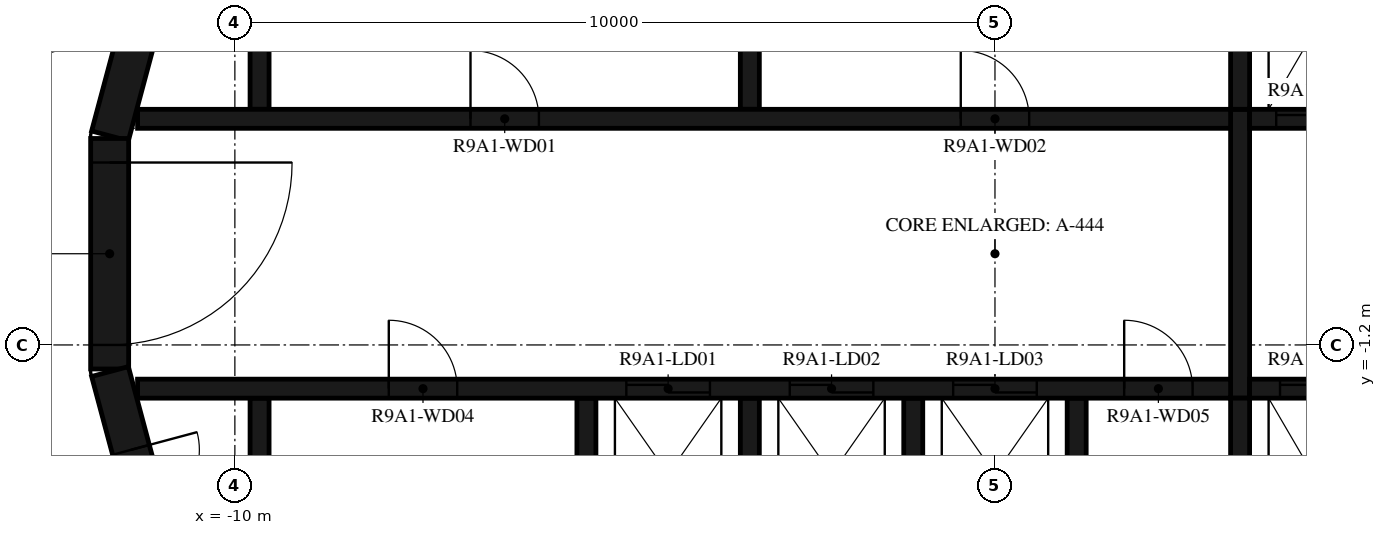
"""IFC4 building model, lengths in metres.
Left out: names, types, materials, properties, quantities, classifications, styles, units other than length and angle.
Written with IfcOpenShell. Run it as: python <this file> out.ifc"""

import sys

from ifc_helpers import new_model, si_unit, direction, frame, frame_2d, origin, place, context, subcontext, project, spatial, polyline, rectangle, outline, extrude, element, fill, save


model = new_model("IFC4")
c1 = context("Model", 3, precision=1e-05, world=origin(), true_north=direction((0.0, 1.0)))
c2 = subcontext(c1, "Body", "Model", "MODEL_VIEW")
j1 = project(units=[si_unit("LENGTHUNIT", "METRE"), si_unit("PLANEANGLEUNIT", "RADIAN")], contexts=[c1])
p1 = place(None, origin())
s1 = spatial("IfcSite", under=j1, at=p1, CompositionType="ELEMENT")
p2 = place(p1, origin())
s2 = spatial("IfcBuilding", under=s1, at=p2, CompositionType="ELEMENT")
p3 = place(p2, frame((0.0, 0.0, 336.5)))
s3 = spatial("IfcBuildingStorey", under=s2, at=p3, CompositionType="ELEMENT", Elevation=336.5)
p4 = place(p3, frame((-10.858, 4.479, 0.0), z_axis=(0.0, 0.0, 1.0), x_axis=(-0.258734743916, -0.965948410781, 0.0)))
e1 = element("IfcWall", 1, at=p4, inside=s3, PredefinedType="SHEAR", context=c2, shape_type="SweptSolid", body=[
    extrude(rectangle(XDim=3.033, YDim=0.5, at=frame_2d((1.516, 0.0))), origin(), (0.0, 0.0, 1.0), 3.12),
])
p5 = place(p3, frame((-11.647, 1.516, 0.0), z_axis=(0.0, 0.0, 1.0), x_axis=(0.0, -1.0, 0.0)))
e2 = element("IfcWall", 2, at=p5, inside=s3, PredefinedType="SHEAR", context=c2, shape_type="SweptSolid", body=[
    extrude(rectangle(XDim=3.033, YDim=0.5, at=frame_2d((1.516, 0.0))), origin(), (0.0, 0.0, 1.0), 3.12),
])
p6 = place(p5, frame((0.316, 0.0, 0.0)))
e3 = element("IfcOpeningElement", 3, at=p6, cuts=e2, PredefinedType="OPENING", context=c2, shape_type="SweptSolid", body=[
    extrude(rectangle(XDim=2.4, YDim=2.1, at=frame_2d((1.2, 1.05))), frame((0.0, 0.26, 0.0), z_axis=(0.0, -1.0, 0.0), x_axis=(1.0, 0.0, 0.0)), (0.0, 0.0, 1.0), 0.52),
])
p7 = place(p3, frame((-11.643, -1.55, 0.0), z_axis=(0.0, 0.0, 1.0), x_axis=(0.258734743916, -0.965948410781, 0.0)))
e4 = element("IfcWall", 4, at=p7, inside=s3, PredefinedType="SHEAR", context=c2, shape_type="SweptSolid", body=[
    extrude(rectangle(XDim=3.033, YDim=0.5, at=frame_2d((1.516, 0.0))), origin(), (0.0, 0.0, 1.0), 3.12),
])
p8 = place(p7, frame((1.066, 0.0, 0.0)))
e5 = element("IfcOpeningElement", 5, at=p8, cuts=e4, PredefinedType="OPENING", context=c2, shape_type="SweptSolid", body=[
    extrude(rectangle(XDim=0.9, YDim=2.1, at=frame_2d((0.45, 1.05))), frame((0.0, 0.26, 0.0), z_axis=(0.0, -1.0, 0.0), x_axis=(1.0, 0.0, 0.0)), (0.0, 0.0, 1.0), 0.52),
])
p9 = place(p3, origin())
e6 = element("IfcWall", 6, at=p9, inside=s3, PredefinedType="SHEAR", context=c2, shape_type="SweptSolid", body=[
    extrude(outline(polyline([(-9.8, 1.9), (-9.55, 1.9), (-9.55, 4.8), (-3.35, 4.8), (-3.35, 1.9), (-3.1, 1.9), (-3.1, 4.8), (3.1, 4.8), (3.1, 1.9), (3.35, 1.9), (3.35, 4.8), (5.25, 4.8), (5.25, 1.9), (5.5, 1.9), (5.5, 4.8), (7.4, 4.8), (7.4, 1.9), (7.65, 1.9), (7.65, 4.8), (9.55, 4.8), (9.55, 1.9), (9.8, 1.9), (9.8, 4.8), (9.8, 5.05), (-9.8, 5.05), (-9.8, 4.8), (-9.8, 1.9)])), origin(), (0.0, 0.0, 1.0), 3.12),
])
p10 = place(p3, origin())
e7 = element("IfcWall", 7, at=p10, inside=s3, PredefinedType="SHEAR", context=c2, shape_type="SweptSolid", body=[
    extrude(outline(polyline([(9.8, -5.05), (9.8, -4.8), (9.8, -1.9), (9.55, -1.9), (9.55, -4.8), (7.65, -4.8), (7.65, -1.9), (7.4, -1.9), (7.4, -4.8), (5.5, -4.8), (5.5, -1.9), (5.25, -1.9), (5.25, -4.8), (3.35, -4.8), (3.35, -1.9), (3.1, -1.9), (3.1, -4.8), (1.2, -4.8), (1.2, -1.9), (0.95, -1.9), (0.95, -4.8), (-0.95, -4.8), (-0.95, -1.9), (-1.2, -1.9), (-1.2, -4.8), (-3.1, -4.8), (-3.1, -1.9), (-3.35, -1.9), (-3.35, -4.8), (-5.25, -4.8), (-5.25, -1.9), (-5.5, -1.9), (-5.5, -4.8), (-9.55, -4.8), (-9.55, -1.9), (-9.8, -1.9), (-9.8, -4.8), (-9.8, -5.05), (9.8, -5.05)])), origin(), (0.0, 0.0, 1.0), 3.12),
])
p11 = place(p3, frame((-11.28, 1.775, 0.0), z_axis=(0.0, 0.0, 1.0), x_axis=(1.0, 0.0, 0.0)))
e8 = element("IfcWall", 8, at=p11, inside=s3, PredefinedType="SHEAR", context=c2, shape_type="SweptSolid", body=[
    extrude(rectangle(XDim=14.38, YDim=0.25, at=frame_2d((7.19, 0.0))), origin(), (0.0, 0.0, 1.0), 3.12),
])
p12 = place(p11, frame((4.38, 0.0, 0.0)))
e9 = element("IfcOpeningElement", 9, at=p12, cuts=e8, PredefinedType="OPENING", context=c2, shape_type="SweptSolid", body=[
    extrude(rectangle(XDim=0.9, YDim=2.1, at=frame_2d((0.45, 1.05))), frame((0.0, 0.135, 0.0), z_axis=(0.0, -1.0, 0.0), x_axis=(1.0, 0.0, 0.0)), (0.0, 0.0, 1.0), 0.27),
])
p13 = place(p11, frame((10.83, 0.0, 0.0)))
e10 = element("IfcOpeningElement", 10, at=p13, cuts=e8, PredefinedType="OPENING", context=c2, shape_type="SweptSolid", body=[
    extrude(rectangle(XDim=0.9, YDim=2.1, at=frame_2d((0.45, 1.05))), frame((0.0, 0.135, 0.0), z_axis=(0.0, -1.0, 0.0), x_axis=(1.0, 0.0, 0.0)), (0.0, 0.0, 1.0), 0.27),
])
p14 = place(p3, frame((3.35, 1.775, 0.0), z_axis=(0.0, 0.0, 1.0), x_axis=(1.0, 0.0, 0.0)))
e11 = element("IfcWall", 11, at=p14, inside=s3, PredefinedType="SHEAR", context=c2, shape_type="SweptSolid", body=[
    extrude(rectangle(XDim=7.93, YDim=0.25, at=frame_2d((3.965, 0.0))), origin(), (0.0, 0.0, 1.0), 3.12),
])
p15 = place(p14, frame((0.35, 0.0, 0.0)))
e12 = element("IfcOpeningElement", 12, at=p15, cuts=e11, PredefinedType="OPENING", context=c2, shape_type="SweptSolid", body=[
    extrude(rectangle(XDim=1.2, YDim=2.4, at=frame_2d((0.6, 1.2))), frame((0.0, 0.135, 0.0), z_axis=(0.0, -1.0, 0.0), x_axis=(1.0, 0.0, 0.0)), (0.0, 0.0, 1.0), 0.27),
])
p16 = place(p14, frame((2.5, 0.0, 0.0)))
e13 = element("IfcOpeningElement", 13, at=p16, cuts=e11, PredefinedType="OPENING", context=c2, shape_type="SweptSolid", body=[
    extrude(rectangle(XDim=1.2, YDim=2.4, at=frame_2d((0.6, 1.2))), frame((0.0, 0.135, 0.0), z_axis=(0.0, -1.0, 0.0), x_axis=(1.0, 0.0, 0.0)), (0.0, 0.0, 1.0), 0.27),
])
p17 = place(p14, frame((4.8, 0.0, 0.0)))
e14 = element("IfcOpeningElement", 14, at=p17, cuts=e11, PredefinedType="OPENING", context=c2, shape_type="SweptSolid", body=[
    extrude(rectangle(XDim=0.9, YDim=2.1, at=frame_2d((0.45, 1.05))), frame((0.0, 0.135, 0.0), z_axis=(0.0, -1.0, 0.0), x_axis=(1.0, 0.0, 0.0)), (0.0, 0.0, 1.0), 0.27),
])
p18 = place(p3, frame((-11.28, -1.775, 0.0), z_axis=(0.0, 0.0, 1.0), x_axis=(1.0, 0.0, 0.0)))
e15 = element("IfcWall", 15, at=p18, inside=s3, PredefinedType="SHEAR", context=c2, shape_type="SweptSolid", body=[
    extrude(rectangle(XDim=14.38, YDim=0.25, at=frame_2d((7.19, 0.0))), origin(), (0.0, 0.0, 1.0), 3.12),
])
p19 = place(p18, frame((6.43, 0.0, 0.0)))
e16 = element("IfcOpeningElement", 16, at=p19, cuts=e15, PredefinedType="OPENING", context=c2, shape_type="SweptSolid", body=[
    extrude(rectangle(XDim=1.1, YDim=2.1, at=frame_2d((0.55, 1.05))), frame((0.0, 0.135, 0.0), z_axis=(0.0, -1.0, 0.0), x_axis=(1.0, 0.0, 0.0)), (0.0, 0.0, 1.0), 0.27),
])
p20 = place(p18, frame((8.58, 0.0, 0.0)))
e17 = element("IfcOpeningElement", 17, at=p20, cuts=e15, PredefinedType="OPENING", context=c2, shape_type="SweptSolid", body=[
    extrude(rectangle(XDim=1.1, YDim=2.1, at=frame_2d((0.55, 1.05))), frame((0.0, 0.135, 0.0), z_axis=(0.0, -1.0, 0.0), x_axis=(1.0, 0.0, 0.0)), (0.0, 0.0, 1.0), 0.27),
])
p21 = place(p18, frame((10.73, 0.0, 0.0)))
e18 = element("IfcOpeningElement", 18, at=p21, cuts=e15, PredefinedType="OPENING", context=c2, shape_type="SweptSolid", body=[
    extrude(rectangle(XDim=1.1, YDim=2.1, at=frame_2d((0.55, 1.05))), frame((0.0, 0.135, 0.0), z_axis=(0.0, -1.0, 0.0), x_axis=(1.0, 0.0, 0.0)), (0.0, 0.0, 1.0), 0.27),
])
p22 = place(p18, frame((3.305, 0.0, 0.0)))
e19 = element("IfcOpeningElement", 19, at=p22, cuts=e15, PredefinedType="OPENING", context=c2, shape_type="SweptSolid", body=[
    extrude(rectangle(XDim=0.9, YDim=2.1, at=frame_2d((0.45, 1.05))), frame((0.0, 0.135, 0.0), z_axis=(0.0, -1.0, 0.0), x_axis=(1.0, 0.0, 0.0)), (0.0, 0.0, 1.0), 0.27),
])
p23 = place(p18, frame((12.98, 0.0, 0.0)))
e20 = element("IfcOpeningElement", 20, at=p23, cuts=e15, PredefinedType="OPENING", context=c2, shape_type="SweptSolid", body=[
    extrude(rectangle(XDim=0.9, YDim=2.1, at=frame_2d((0.45, 1.05))), frame((0.0, 0.135, 0.0), z_axis=(0.0, -1.0, 0.0), x_axis=(1.0, 0.0, 0.0)), (0.0, 0.0, 1.0), 0.27),
])
p24 = place(p3, frame((3.35, -1.775, 0.0), z_axis=(0.0, 0.0, 1.0), x_axis=(1.0, 0.0, 0.0)))
e21 = element("IfcWall", 21, at=p24, inside=s3, PredefinedType="SHEAR", context=c2, shape_type="SweptSolid", body=[
    extrude(rectangle(XDim=7.93, YDim=0.25, at=frame_2d((3.965, 0.0))), origin(), (0.0, 0.0, 1.0), 3.12),
])
p25 = place(p24, frame((0.4, 0.0, 0.0)))
e22 = element("IfcOpeningElement", 22, at=p25, cuts=e21, PredefinedType="OPENING", context=c2, shape_type="SweptSolid", body=[
    extrude(rectangle(XDim=1.1, YDim=2.4, at=frame_2d((0.55, 1.2))), frame((0.0, 0.135, 0.0), z_axis=(0.0, -1.0, 0.0), x_axis=(1.0, 0.0, 0.0)), (0.0, 0.0, 1.0), 0.27),
])
p26 = place(p24, frame((2.55, 0.0, 0.0)))
e23 = element("IfcOpeningElement", 23, at=p26, cuts=e21, PredefinedType="OPENING", context=c2, shape_type="SweptSolid", body=[
    extrude(rectangle(XDim=1.1, YDim=2.4, at=frame_2d((0.55, 1.2))), frame((0.0, 0.135, 0.0), z_axis=(0.0, -1.0, 0.0), x_axis=(1.0, 0.0, 0.0)), (0.0, 0.0, 1.0), 0.27),
])
p27 = place(p24, frame((4.7, 0.0, 0.0)))
e24 = element("IfcOpeningElement", 24, at=p27, cuts=e21, PredefinedType="OPENING", context=c2, shape_type="SweptSolid", body=[
    extrude(rectangle(XDim=1.1, YDim=2.4, at=frame_2d((0.55, 1.2))), frame((0.0, 0.135, 0.0), z_axis=(0.0, -1.0, 0.0), x_axis=(1.0, 0.0, 0.0)), (0.0, 0.0, 1.0), 0.27),
])
p28 = place(p3, frame((3.225, -1.9, 0.0), z_axis=(0.0, 0.0, 1.0), x_axis=(0.0, 1.0, 0.0)))
e25 = element("IfcWall", 25, at=p28, inside=s3, PredefinedType="SHEAR", context=c2, shape_type="SweptSolid", body=[
    extrude(rectangle(XDim=3.8, YDim=0.25, at=frame_2d((1.9, 0.0))), origin(), (0.0, 0.0, 1.0), 3.12),
])
p29 = place(p3, frame((-13.769, -1.691, 0.0), z_axis=(0.0, 0.0, 1.0), x_axis=(0.372720094028, -0.927943819155, 0.0)))
e26 = element("IfcWall", 26, at=p29, inside=s3, PredefinedType="STANDARD", context=c2, shape_type="SweptSolid", body=[
    extrude(rectangle(XDim=4.875, YDim=0.2, at=frame_2d((2.438, 0.0))), origin(), (0.0, 0.0, 1.0), 3.12),
])
p30 = place(p6, origin())
e27 = element("IfcDoor", 27, at=p30, inside=s3, OperationType="DOUBLE_DOOR_SINGLE_SWING", PredefinedType="DOOR", context=c2, shape_type="SweptSolid", body=[
    extrude(rectangle(XDim=2.4, YDim=2.1, at=frame_2d((1.2, 1.05))), frame((0.0, 0.025, 0.0), z_axis=(0.0, -1.0, 0.0), x_axis=(1.0, 0.0, 0.0)), (0.0, 0.0, 1.0), 0.05),
])
fill(e3, e27)
p31 = place(p15, origin())
e28 = element("IfcDoor", 28, at=p31, inside=s3, OperationType="DOUBLE_DOOR_SLIDING", PredefinedType="DOOR", context=c2, shape_type="SweptSolid", body=[
    extrude(rectangle(XDim=1.2, YDim=2.4, at=frame_2d((0.6, 1.2))), frame((0.0, 0.025, 0.0), z_axis=(0.0, -1.0, 0.0), x_axis=(1.0, 0.0, 0.0)), (0.0, 0.0, 1.0), 0.05),
])
fill(e12, e28)
p32 = place(p19, origin())
e29 = element("IfcDoor", 29, at=p32, inside=s3, OperationType="DOUBLE_DOOR_SLIDING", PredefinedType="DOOR", context=c2, shape_type="SweptSolid", body=[
    extrude(rectangle(XDim=1.1, YDim=2.1, at=frame_2d((0.55, 1.05))), frame((0.0, 0.025, 0.0), z_axis=(0.0, -1.0, 0.0), x_axis=(1.0, 0.0, 0.0)), (0.0, 0.0, 1.0), 0.05),
])
fill(e16, e29)
p33 = place(p20, origin())
e30 = element("IfcDoor", 30, at=p33, inside=s3, OperationType="DOUBLE_DOOR_SLIDING", PredefinedType="DOOR", context=c2, shape_type="SweptSolid", body=[
    extrude(rectangle(XDim=1.1, YDim=2.1, at=frame_2d((0.55, 1.05))), frame((0.0, 0.025, 0.0), z_axis=(0.0, -1.0, 0.0), x_axis=(1.0, 0.0, 0.0)), (0.0, 0.0, 1.0), 0.05),
])
fill(e17, e30)
p34 = place(p21, origin())
e31 = element("IfcDoor", 31, at=p34, inside=s3, OperationType="DOUBLE_DOOR_SLIDING", PredefinedType="DOOR", context=c2, shape_type="SweptSolid", body=[
    extrude(rectangle(XDim=1.1, YDim=2.1, at=frame_2d((0.55, 1.05))), frame((0.0, 0.025, 0.0), z_axis=(0.0, -1.0, 0.0), x_axis=(1.0, 0.0, 0.0)), (0.0, 0.0, 1.0), 0.05),
])
fill(e18, e31)
p35 = place(p25, origin())
e32 = element("IfcDoor", 32, at=p35, inside=s3, OperationType="DOUBLE_DOOR_SLIDING", PredefinedType="DOOR", context=c2, shape_type="SweptSolid", body=[
    extrude(rectangle(XDim=1.1, YDim=2.4, at=frame_2d((0.55, 1.2))), frame((0.0, 0.025, 0.0), z_axis=(0.0, -1.0, 0.0), x_axis=(1.0, 0.0, 0.0)), (0.0, 0.0, 1.0), 0.05),
])
fill(e22, e32)
p36 = place(p12, origin())
e33 = element("IfcDoor", 33, at=p36, inside=s3, OperationType="SINGLE_SWING_LEFT", PredefinedType="DOOR", context=c2, shape_type="SweptSolid", body=[
    extrude(rectangle(XDim=0.9, YDim=2.1, at=frame_2d((0.45, 1.05))), frame((0.0, 0.025, 0.0), z_axis=(0.0, -1.0, 0.0), x_axis=(1.0, 0.0, 0.0)), (0.0, 0.0, 1.0), 0.05),
])
fill(e9, e33)
p37 = place(p13, origin())
e34 = element("IfcDoor", 34, at=p37, inside=s3, OperationType="SINGLE_SWING_RIGHT", PredefinedType="DOOR", context=c2, shape_type="SweptSolid", body=[
    extrude(rectangle(XDim=0.9, YDim=2.1, at=frame_2d((0.45, 1.05))), frame((0.0, 0.025, 0.0), z_axis=(0.0, -1.0, 0.0), x_axis=(1.0, 0.0, 0.0)), (0.0, 0.0, 1.0), 0.05),
])
fill(e10, e34)
p38 = place(p22, origin())
e35 = element("IfcDoor", 35, at=p38, inside=s3, OperationType="SINGLE_SWING_RIGHT", PredefinedType="DOOR", context=c2, shape_type="SweptSolid", body=[
    extrude(rectangle(XDim=0.9, YDim=2.1, at=frame_2d((0.45, 1.05))), frame((0.0, 0.025, 0.0), z_axis=(0.0, -1.0, 0.0), x_axis=(1.0, 0.0, 0.0)), (0.0, 0.0, 1.0), 0.05),
])
fill(e19, e35)
p39 = place(p23, origin())
e36 = element("IfcDoor", 36, at=p39, inside=s3, OperationType="SINGLE_SWING_LEFT", PredefinedType="DOOR", context=c2, shape_type="SweptSolid", body=[
    extrude(rectangle(XDim=0.9, YDim=2.1, at=frame_2d((0.45, 1.05))), frame((0.0, 0.025, 0.0), z_axis=(0.0, -1.0, 0.0), x_axis=(1.0, 0.0, 0.0)), (0.0, 0.0, 1.0), 0.05),
])
fill(e20, e36)
p40 = place(p8, origin())
e37 = element("IfcDoor", 37, at=p40, inside=s3, OperationType="SINGLE_SWING_RIGHT", PredefinedType="DOOR", context=c2, shape_type="SweptSolid", body=[
    extrude(rectangle(XDim=0.9, YDim=2.1, at=frame_2d((0.45, 1.05))), frame((0.0, 0.025, 0.0), z_axis=(0.0, -1.0, 0.0), x_axis=(1.0, 0.0, 0.0)), (0.0, 0.0, 1.0), 0.05),
])
fill(e5, e37)
save(model, sys.argv[1])
